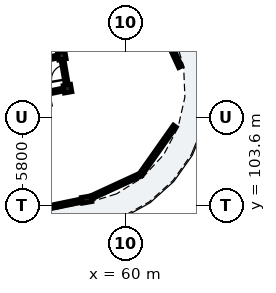
"""IFC4 building model, lengths in metres.
Left out: names, types, materials, properties, quantities, classifications, styles, units other than length and angle.
Written with IfcOpenShell. Run it as: python <this file> out.ifc"""

import sys

from ifc_helpers import new_model, si_unit, direction, frame, frame_2d, origin, origin_2d, place, context, subcontext, project, spatial, rectangle, extrude, element, fill, save


model = new_model("IFC4")
c1 = context("Model", 3, precision=1e-05, world=origin(), true_north=direction((0.0, 1.0)))
c2 = subcontext(c1, "Body", "Model", "MODEL_VIEW")
j1 = project(units=[si_unit("LENGTHUNIT", "METRE"), si_unit("PLANEANGLEUNIT", "RADIAN")], contexts=[c1])
p1 = place(None, origin())
s1 = spatial("IfcSite", under=j1, at=p1, CompositionType="ELEMENT")
p2 = place(p1, origin())
s2 = spatial("IfcBuilding", under=s1, at=p2, CompositionType="ELEMENT")
p3 = place(p2, frame((0.0, 0.0, 35.72)))
s3 = spatial("IfcBuildingStorey", under=s2, at=p3, CompositionType="ELEMENT", Elevation=35.72)
p4 = place(p3, frame((57.451, 104.004, 0.0), z_axis=(0.0, 0.0, 1.0), x_axis=(-0.169827298811, 0.985473839622, 0.0)))
e1 = element("IfcColumn", 1, at=p4, inside=s3, PredefinedType="PILASTER", context=c2, shape_type="SweptSolid", body=[
    extrude(rectangle(XDim=0.39, YDim=0.63, at=origin_2d()), origin(), (0.0, 0.0, 1.0), 3.115),
])
for number, where, z_axis, x_axis in (
    (2, (56.194, 111.297, 0.0), (0.0, 0.0, 1.0), (-0.17, 0.985, 0.0)),
    (3, (55.821, 113.465, 0.0), (0.0, 0.0, 1.0), (-0.17, 0.985, 0.0)),
):
    element("IfcColumn", number, at=place(p3, frame(where, z_axis=z_axis, x_axis=x_axis)), inside=s3, PredefinedType="COLUMN", context=c2, shape_type="SweptSolid", body=[
        extrude(rectangle(XDim=0.5, YDim=0.5, at=origin_2d()), origin(), (0.0, 0.0, 1.0), 3.115),
    ])
p5 = place(p3, frame((57.29, 103.971, 0.0), z_axis=(0.0, 0.0, 1.0), x_axis=(-0.979344333802, -0.20219959409, 0.0)))
e4 = element("IfcWall", 4, at=p5, inside=s3, PredefinedType="SOLIDWALL", context=c2, shape_type="SweptSolid", body=[
    extrude(rectangle(XDim=2.545, YDim=0.225, at=frame_2d((1.272, 0.0))), origin(), (0.0, 0.0, 1.0), 2.355),
])
p6 = place(p5, frame((0.693, 0.0, 0.55)))
e5 = element("IfcOpeningElement", 5, at=p6, cuts=e4, PredefinedType="OPENING", context=c2, shape_type="SweptSolid", body=[
    extrude(rectangle(XDim=1.16, YDim=1.485, at=frame_2d((0.58, 0.743))), frame((0.0, 0.123, 0.0), z_axis=(0.0, -1.0, 0.0), x_axis=(1.0, 0.0, 0.0)), (0.0, 0.0, 1.0), 0.245),
])
p7 = place(p3, frame((61.971, 116.275, 0.0), z_axis=(0.0, 0.0, 1.0), x_axis=(0.419109676255, -0.907935614055, 0.0)))
e6 = element("IfcWall", 6, at=p7, inside=s3, PredefinedType="SOLIDWALL", context=c2, shape_type="SweptSolid", body=[
    extrude(rectangle(XDim=3.908, YDim=0.225, at=frame_2d((1.954, 0.0))), origin(), (0.0, 0.0, 1.0), 2.355),
])
p8 = place(p3, frame((63.254, 108.835, 0.0), z_axis=(0.0, 0.0, 1.0), x_axis=(-0.576773939634, -0.816903802512, 0.0)))
e7 = element("IfcWall", 7, at=p8, inside=s3, PredefinedType="SOLIDWALL", context=c2, shape_type="SweptSolid", body=[
    extrude(rectangle(XDim=3.908, YDim=0.225, at=frame_2d((1.954, 0.0))), origin(), (0.0, 0.0, 1.0), 2.355),
])
p9 = place(p8, frame((0.979, 0.0, 0.4)))
e8 = element("IfcOpeningElement", 8, at=p9, cuts=e7, PredefinedType="OPENING", context=c2, shape_type="SweptSolid", body=[
    extrude(rectangle(XDim=1.95, YDim=1.78, at=frame_2d((0.975, 0.89))), frame((0.0, 0.123, 0.0), z_axis=(0.0, -1.0, 0.0), x_axis=(1.0, 0.0, 0.0)), (0.0, 0.0, 1.0), 0.245),
])
p10 = place(p3, frame((61.0, 105.642, 0.0), z_axis=(0.0, 0.0, 1.0), x_axis=(-0.907935614055, -0.419109676255, 0.0)))
e9 = element("IfcWall", 9, at=p10, inside=s3, PredefinedType="SOLIDWALL", context=c2, shape_type="SweptSolid", body=[
    extrude(rectangle(XDim=3.908, YDim=0.225, at=frame_2d((1.954, 0.0))), origin(), (0.0, 0.0, 1.0), 2.355),
])
p11 = place(p3, frame((55.478, 113.394, 0.0), z_axis=(0.0, 0.0, 1.0), x_axis=(-0.979348418612, -0.202179808492, 0.0)))
e10 = element("IfcWall", 10, at=p11, inside=s3, PredefinedType="PARTITIONING", context=c2, shape_type="SweptSolid", body=[
    extrude(rectangle(XDim=2.863, YDim=0.205, at=frame_2d((1.432, 0.0))), origin(), (0.0, 0.0, 1.0), 2.37),
])
p12 = place(p11, frame((0.967, 0.0, 0.0)))
e11 = element("IfcOpeningElement", 11, at=p12, cuts=e10, PredefinedType="OPENING", context=c2, shape_type="SweptSolid", body=[
    extrude(rectangle(XDim=0.93, YDim=2.12, at=frame_2d((0.465, 1.06))), frame((0.0, 0.113, 0.0), z_axis=(0.0, -1.0, 0.0), x_axis=(1.0, 0.0, 0.0)), (0.0, 0.0, 1.0), 0.225),
])
p13 = place(p3, frame((55.852, 111.226, 0.0), z_axis=(0.0, 0.0, 1.0), x_axis=(-0.979349423541, -0.202174940608, 0.0)))
e12 = element("IfcWall", 12, at=p13, inside=s3, PredefinedType="PARTITIONING", context=c2, shape_type="SweptSolid", body=[
    extrude(rectangle(XDim=2.718, YDim=0.205, at=frame_2d((1.359, 0.0))), origin(), (0.0, 0.0, 1.0), 2.37),
])
p14 = place(p13, frame((0.894, 0.0, 0.0)))
e13 = element("IfcOpeningElement", 13, at=p14, cuts=e12, PredefinedType="OPENING", context=c2, shape_type="SweptSolid", body=[
    extrude(rectangle(XDim=0.93, YDim=2.12, at=frame_2d((0.465, 1.06))), frame((0.0, 0.113, 0.0), z_axis=(0.0, -1.0, 0.0), x_axis=(1.0, 0.0, 0.0)), (0.0, 0.0, 1.0), 0.225),
])
p15 = place(p3, frame((56.186, 111.346, 0.0), z_axis=(0.0, 0.0, 1.0), x_axis=(-0.169864088707, 0.98546749889, 0.0)))
e14 = element("IfcWall", 14, at=p15, inside=s3, PredefinedType="PARTITIONING", context=c2, shape_type="SweptSolid", body=[
    extrude(rectangle(XDim=2.1, YDim=0.205, at=frame_2d((1.05, 0.0))), origin(), (0.0, 0.0, 1.0), 2.37),
])
p16 = place(p15, frame((0.57, 0.0, 0.0)))
e15 = element("IfcOpeningElement", 15, at=p16, cuts=e14, PredefinedType="OPENING", context=c2, shape_type="SweptSolid", body=[
    extrude(rectangle(XDim=0.95, YDim=2.13, at=frame_2d((0.475, 1.065))), frame((0.0, 0.113, 0.0), z_axis=(0.0, -1.0, 0.0), x_axis=(1.0, 0.0, 0.0)), (0.0, 0.0, 1.0), 0.225),
])
p17 = place(p6, origin())
e16 = element("IfcWindow", 16, at=p17, inside=s3, PartitioningType="SINGLE_PANEL", PredefinedType="WINDOW", context=c2, shape_type="SweptSolid", body=[
    extrude(rectangle(XDim=1.16, YDim=1.485, at=frame_2d((0.58, 0.743))), frame((0.0, 0.03, 0.0), z_axis=(0.0, -1.0, 0.0), x_axis=(1.0, 0.0, 0.0)), (0.0, 0.0, 1.0), 0.06),
])
fill(e5, e16)
p18 = place(p9, origin())
e17 = element("IfcWindow", 17, at=p18, inside=s3, PartitioningType="SINGLE_PANEL", PredefinedType="WINDOW", context=c2, shape_type="SweptSolid", body=[
    extrude(rectangle(XDim=1.95, YDim=1.78, at=frame_2d((0.975, 0.89))), frame((0.0, 0.03, 0.0), z_axis=(0.0, -1.0, 0.0), x_axis=(1.0, 0.0, 0.0)), (0.0, 0.0, 1.0), 0.06),
])
fill(e8, e17)
p19 = place(p16, origin())
e18 = element("IfcDoor", 18, at=p19, inside=s3, OperationType="SINGLE_SWING_LEFT", PredefinedType="DOOR", context=c2, shape_type="SweptSolid", body=[
    extrude(rectangle(XDim=0.95, YDim=2.13, at=frame_2d((0.475, 1.065))), frame((0.0, 0.025, 0.0), z_axis=(0.0, -1.0, 0.0), x_axis=(1.0, 0.0, 0.0)), (0.0, 0.0, 1.0), 0.05),
])
fill(e15, e18)
save(model, sys.argv[1])
